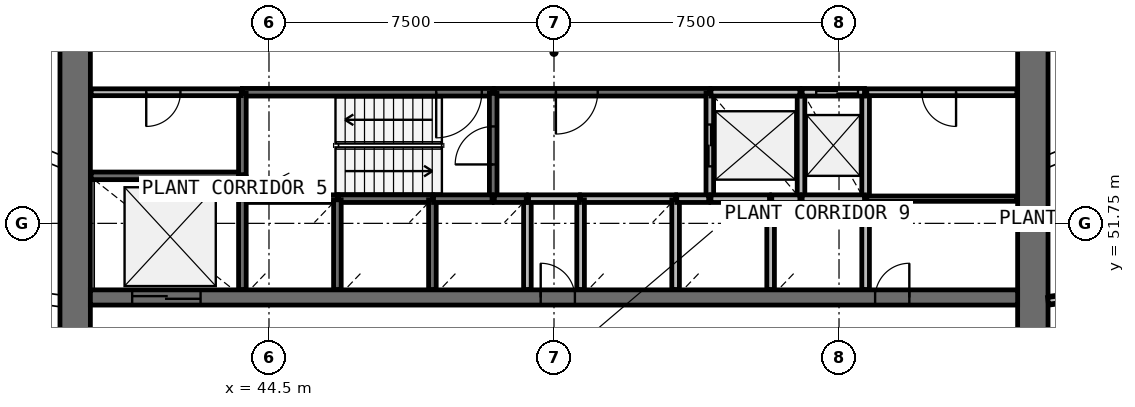
"""IFC4 building model, lengths in metres.
Left out: names, types, materials, properties, quantities, classifications, styles, units other than length and angle.
Written with IfcOpenShell. Run it as: python <this file> out.ifc"""

import sys

from ifc_helpers import new_model, si_unit, direction, frame, frame_2d, origin, place, context, subcontext, project, spatial, rectangle, extrude, source, transform, mapped, element, fill, save


model = new_model("IFC4")
c1 = context("Model", 3, precision=1e-05, world=origin(), true_north=direction((0.0, 1.0)))
c2 = subcontext(c1, "Body", "Model", "MODEL_VIEW")
j1 = project(units=[si_unit("LENGTHUNIT", "METRE"), si_unit("PLANEANGLEUNIT", "RADIAN")], contexts=[c1])
p1 = place(None, origin())
s1 = spatial("IfcSite", under=j1, at=p1, CompositionType="ELEMENT")
p2 = place(p1, origin())
s2 = spatial("IfcBuilding", under=s1, at=p2, CompositionType="ELEMENT")
p3 = place(p2, frame((0.0, 0.0, 129.0)))
s3 = spatial("IfcBuildingStorey", under=s2, at=p3, CompositionType="ELEMENT", Elevation=129.0)
p4 = place(p3, frame((64.6, 38.0, 0.0), z_axis=(0.0, 0.0, 1.0), x_axis=(0.0, 1.0, 0.0)))
e1 = element("IfcWall", 1, at=p4, inside=s3, PredefinedType="SHEAR", context=c2, shape_type="SweptSolid", body=[
    extrude(rectangle(XDim=20.0, YDim=0.8, at=frame_2d((10.0, 0.0))), origin(), (0.0, 0.0, 1.0), 4.1),
])
p5 = place(p4, frame((9.1, 0.0, 0.0)))
e2 = element("IfcOpeningElement", 2, at=p5, cuts=e1, PredefinedType="OPENING", context=c2, shape_type="SweptSolid", body=[
    extrude(rectangle(XDim=1.8, YDim=2.1, at=frame_2d((0.9, 1.05))), frame((0.0, 0.41, 0.0), z_axis=(0.0, -1.0, 0.0), x_axis=(1.0, 0.0, 0.0)), (0.0, 0.0, 1.0), 0.82),
])
p6 = place(p3, frame((39.4, 58.0, 0.0), z_axis=(0.0, 0.0, 1.0), x_axis=(0.0, -1.0, 0.0)))
e3 = element("IfcWall", 3, at=p6, inside=s3, PredefinedType="SHEAR", context=c2, shape_type="SweptSolid", body=[
    extrude(rectangle(XDim=20.0, YDim=0.8, at=frame_2d((10.0, 0.0))), origin(), (0.0, 0.0, 1.0), 4.1),
])
p7 = place(p6, frame((9.1, 0.0, 0.0)))
e4 = element("IfcOpeningElement", 4, at=p7, cuts=e3, PredefinedType="OPENING", context=c2, shape_type="SweptSolid", body=[
    extrude(rectangle(XDim=1.8, YDim=2.1, at=frame_2d((0.9, 1.05))), frame((0.0, 0.41, 0.0), z_axis=(0.0, -1.0, 0.0), x_axis=(1.0, 0.0, 0.0)), (0.0, 0.0, 1.0), 0.82),
])
p8 = place(p3, frame((39.8, 49.8, 0.0), z_axis=(0.0, 0.0, 1.0), x_axis=(1.0, 0.0, 0.0)))
e5 = element("IfcWall", 5, at=p8, inside=s3, PredefinedType="SHEAR", context=c2, shape_type="SweptSolid", body=[
    extrude(rectangle(XDim=24.4, YDim=0.4, at=frame_2d((12.2, 0.0))), origin(), (0.0, 0.0, 1.0), 4.1),
])
p9 = place(p8, frame((1.1, 0.0, 0.0)))
e6 = element("IfcOpeningElement", 6, at=p9, cuts=e5, PredefinedType="OPENING", context=c2, shape_type="SweptSolid", body=[
    extrude(rectangle(XDim=1.8, YDim=2.4, at=frame_2d((0.9, 1.2))), frame((0.0, 0.21, 0.0), z_axis=(0.0, -1.0, 0.0), x_axis=(1.0, 0.0, 0.0)), (0.0, 0.0, 1.0), 0.42),
])
p10 = place(p8, frame((20.65, 0.0, 0.0)))
e7 = element("IfcOpeningElement", 7, at=p10, cuts=e5, PredefinedType="OPENING", context=c2, shape_type="SweptSolid", body=[
    extrude(rectangle(XDim=0.9, YDim=2.1, at=frame_2d((0.45, 1.05))), frame((0.0, 0.21, 0.0), z_axis=(0.0, -1.0, 0.0), x_axis=(1.0, 0.0, 0.0)), (0.0, 0.0, 1.0), 0.42),
])
p11 = place(p8, frame((11.85, 0.0, 0.0)))
e8 = element("IfcOpeningElement", 8, at=p11, cuts=e5, PredefinedType="OPENING", context=c2, shape_type="SweptSolid", body=[
    extrude(rectangle(XDim=0.9, YDim=2.1, at=frame_2d((0.45, 1.05))), frame((0.0, 0.21, 0.0), z_axis=(0.0, -1.0, 0.0), x_axis=(1.0, 0.0, 0.0)), (0.0, 0.0, 1.0), 0.42),
])
p12 = place(p3, frame((50.4, 55.2, 0.0), z_axis=(0.0, 0.0, 1.0), x_axis=(-1.0, 0.0, 0.0)))
e9 = element("IfcWall", 9, at=p12, inside=s3, PredefinedType="SOLIDWALL", context=c2, shape_type="SweptSolid", body=[
    extrude(rectangle(XDim=6.6, YDim=0.2, at=frame_2d((3.3, 0.0))), origin(), (0.0, 0.0, 1.0), 3.78),
])
p13 = place(p12, frame((0.3, 0.0, 0.0)))
e10 = element("IfcOpeningElement", 10, at=p13, cuts=e9, PredefinedType="OPENING", context=c2, shape_type="SweptSolid", body=[
    extrude(rectangle(XDim=1.2, YDim=2.1, at=frame_2d((0.6, 1.05))), frame((0.0, 0.11, 0.0), z_axis=(0.0, -1.0, 0.0), x_axis=(1.0, 0.0, 0.0)), (0.0, 0.0, 1.0), 0.22),
])
p14 = place(p3, frame((56.1, 55.2, 0.0), z_axis=(0.0, 0.0, 1.0), x_axis=(-1.0, 0.0, 0.0)))
e11 = element("IfcWall", 11, at=p14, inside=s3, PredefinedType="SOLIDWALL", context=c2, shape_type="SweptSolid", body=[
    extrude(rectangle(XDim=5.67, YDim=0.2, at=frame_2d((2.835, 0.0))), origin(), (0.0, 0.0, 1.0), 3.78),
])
p15 = place(p14, frame((2.95, 0.0, 0.0)))
e12 = element("IfcOpeningElement", 12, at=p15, cuts=e11, PredefinedType="OPENING", context=c2, shape_type="SweptSolid", body=[
    extrude(rectangle(XDim=1.1, YDim=2.1, at=frame_2d((0.55, 1.05))), frame((0.0, 0.11, 0.0), z_axis=(0.0, -1.0, 0.0), x_axis=(1.0, 0.0, 0.0)), (0.0, 0.0, 1.0), 0.22),
])
p16 = place(p3, frame((43.8, 53.0, 0.0), z_axis=(0.0, 0.0, 1.0), x_axis=(-1.0, 0.0, 0.0)))
e13 = element("IfcWall", 13, at=p16, inside=s3, PredefinedType="SOLIDWALL", context=c2, shape_type="SweptSolid", body=[
    extrude(rectangle(XDim=3.98, YDim=0.2, at=frame_2d((1.99, 0.0))), origin(), (0.0, 0.0, 1.0), 3.78),
])
p17 = place(p3, frame((50.4, 52.4, 0.0), z_axis=(0.0, 0.0, 1.0), x_axis=(0.0, 1.0, 0.0)))
e14 = element("IfcWall", 14, at=p17, inside=s3, PredefinedType="SOLIDWALL", context=c2, shape_type="SweptSolid", body=[
    extrude(rectangle(XDim=2.77, YDim=0.2, at=frame_2d((1.385, 0.0))), origin(), (0.0, 0.0, 1.0), 3.78),
])
p18 = place(p17, frame((0.9, 0.0, 0.0)))
e15 = element("IfcOpeningElement", 15, at=p18, cuts=e14, PredefinedType="OPENING", context=c2, shape_type="SweptSolid", body=[
    extrude(rectangle(XDim=1.0, YDim=2.1, at=frame_2d((0.5, 1.05))), frame((0.0, 0.11, 0.0), z_axis=(0.0, -1.0, 0.0), x_axis=(1.0, 0.0, 0.0)), (0.0, 0.0, 1.0), 0.22),
])
p19 = place(p3, frame((56.1, 55.17, 0.0), z_axis=(0.0, 0.0, 1.0), x_axis=(0.0, -1.0, 0.0)))
e16 = element("IfcWall", 16, at=p19, inside=s3, PredefinedType="SOLIDWALL", context=c2, shape_type="SweptSolid", body=[
    extrude(rectangle(XDim=2.77, YDim=0.2, at=frame_2d((1.385, 0.0))), origin(), (0.0, 0.0, 1.0), 3.78),
])
p20 = place(p19, frame((0.82, 0.0, 0.0)))
e17 = element("IfcOpeningElement", 17, at=p20, cuts=e16, PredefinedType="OPENING", context=c2, shape_type="SweptSolid", body=[
    extrude(rectangle(XDim=1.1, YDim=2.1, at=frame_2d((0.55, 1.05))), frame((0.0, 0.11, 0.0), z_axis=(0.0, -1.0, 0.0), x_axis=(1.0, 0.0, 0.0)), (0.0, 0.0, 1.0), 0.22),
])
for number, where, z_axis, x_axis in (
    (18, (58.5, 52.4, 0.0), (0.0, 0.0, 1.0), (0.0, 1.0, 0.0)),
    (19, (60.2, 52.4, 0.0), (0.0, 0.0, 1.0), (0.0, 1.0, 0.0)),
):
    element("IfcWall", number, at=place(p3, frame(where, z_axis=z_axis, x_axis=x_axis)), inside=s3, PredefinedType="SOLIDWALL", context=c2, shape_type="SweptSolid", body=[
        extrude(rectangle(XDim=2.8, YDim=0.2, at=frame_2d((1.4, 0.0))), origin(), (0.0, 0.0, 1.0), 3.78),
    ])
p21 = place(p3, frame((46.3, 52.4, 0.0), z_axis=(0.0, 0.0, 1.0), x_axis=(-1.0, 0.0, 0.0)))
e20 = element("IfcWall", 20, at=p21, inside=s3, PredefinedType="SOLIDWALL", context=c2, shape_type="SweptSolid", body=[
    extrude(rectangle(XDim=2.5, YDim=0.2, at=frame_2d((1.25, 0.0))), origin(), (0.0, 0.0, 1.0), 3.78),
])
p22 = place(p3, frame((48.8, 52.4, 0.0), z_axis=(0.0, 0.0, 1.0), x_axis=(-1.0, 0.0, 0.0)))
e21 = element("IfcWall", 21, at=p22, inside=s3, PredefinedType="SOLIDWALL", context=c2, shape_type="SweptSolid", body=[
    extrude(rectangle(XDim=2.47, YDim=0.2, at=frame_2d((1.235, 0.0))), origin(), (0.0, 0.0, 1.0), 3.78),
])
p23 = place(p3, frame((55.2, 52.4, 0.0), z_axis=(0.0, 0.0, 1.0), x_axis=(-1.0, 0.0, 0.0)))
e22 = element("IfcWall", 22, at=p23, inside=s3, PredefinedType="SOLIDWALL", context=c2, shape_type="SweptSolid", body=[
    extrude(rectangle(XDim=2.5, YDim=0.2, at=frame_2d((1.25, 0.0))), origin(), (0.0, 0.0, 1.0), 3.78),
])
p24 = place(p3, frame((58.47, 55.2, 0.0), z_axis=(0.0, 0.0, 1.0), x_axis=(-1.0, 0.0, 0.0)))
e23 = element("IfcWall", 23, at=p24, inside=s3, PredefinedType="SOLIDWALL", context=c2, shape_type="SweptSolid", body=[
    extrude(rectangle(XDim=2.34, YDim=0.2, at=frame_2d((1.17, 0.0))), origin(), (0.0, 0.0, 1.0), 3.78),
])
for number, where, z_axis, x_axis in (
    (24, (43.8, 52.37, 0.0), (0.0, 0.0, 1.0), (0.0, -1.0, 0.0)),
    (25, (46.3, 50.01, 0.0), (0.0, 0.0, 1.0), (0.0, 1.0, 0.0)),
    (26, (48.8, 50.01, 0.0), (0.0, 0.0, 1.0), (0.0, 1.0, 0.0)),
):
    element("IfcWall", number, at=place(p3, frame(where, z_axis=z_axis, x_axis=x_axis)), inside=s3, PredefinedType="SOLIDWALL", context=c2, shape_type="SweptSolid", body=[
        extrude(rectangle(XDim=2.36, YDim=0.2, at=frame_2d((1.18, 0.0))), origin(), (0.0, 0.0, 1.0), 3.78),
    ])
p25 = place(p3, frame((51.3, 50.01, 0.0), z_axis=(0.0, 0.0, 1.0), x_axis=(0.0, 1.0, 0.0)))
e27 = element("IfcWall", 27, at=p25, inside=s3, PredefinedType="SOLIDWALL", context=c2, shape_type="SweptSolid", body=[
    extrude(rectangle(XDim=2.39, YDim=0.2, at=frame_2d((1.195, 0.0))), origin(), (0.0, 0.0, 1.0), 3.78),
])
for number, where, z_axis, x_axis in (
    (28, (52.7, 52.37, 0.0), (0.0, 0.0, 1.0), (0.0, -1.0, 0.0)),
    (29, (55.2, 50.01, 0.0), (0.0, 0.0, 1.0), (0.0, 1.0, 0.0)),
):
    element("IfcWall", number, at=place(p3, frame(where, z_axis=z_axis, x_axis=x_axis)), inside=s3, PredefinedType="SOLIDWALL", context=c2, shape_type="SweptSolid", body=[
        extrude(rectangle(XDim=2.36, YDim=0.2, at=frame_2d((1.18, 0.0))), origin(), (0.0, 0.0, 1.0), 3.78),
    ])
p26 = place(p3, frame((57.7, 50.01, 0.0), z_axis=(0.0, 0.0, 1.0), x_axis=(0.0, 1.0, 0.0)))
e30 = element("IfcWall", 30, at=p26, inside=s3, PredefinedType="SOLIDWALL", context=c2, shape_type="SweptSolid", body=[
    extrude(rectangle(XDim=2.39, YDim=0.2, at=frame_2d((1.195, 0.0))), origin(), (0.0, 0.0, 1.0), 3.78),
])
p27 = place(p3, frame((60.2, 50.01, 0.0), z_axis=(0.0, 0.0, 1.0), x_axis=(0.0, 1.0, 0.0)))
e31 = element("IfcWall", 31, at=p27, inside=s3, PredefinedType="SOLIDWALL", context=c2, shape_type="SweptSolid", body=[
    extrude(rectangle(XDim=2.36, YDim=0.2, at=frame_2d((1.18, 0.0))), origin(), (0.0, 0.0, 1.0), 3.78),
])
p28 = place(p3, frame((43.8, 55.17, 0.0), z_axis=(0.0, 0.0, 1.0), x_axis=(0.0, -1.0, 0.0)))
e32 = element("IfcWall", 32, at=p28, inside=s3, PredefinedType="SOLIDWALL", context=c2, shape_type="SweptSolid", body=[
    extrude(rectangle(XDim=2.14, YDim=0.2, at=frame_2d((1.07, 0.0))), origin(), (0.0, 0.0, 1.0), 3.78),
])
p29 = place(p3, frame((60.17, 52.4, 0.0), z_axis=(0.0, 0.0, 1.0), x_axis=(-1.0, 0.0, 0.0)))
e33 = element("IfcWall", 33, at=p29, inside=s3, PredefinedType="SOLIDWALL", context=c2, shape_type="SweptSolid", body=[
    extrude(rectangle(XDim=1.64, YDim=0.2, at=frame_2d((0.82, 0.0))), origin(), (0.0, 0.0, 1.0), 3.78),
])
p30 = place(p3, frame((60.17, 55.2, 0.0), z_axis=(0.0, 0.0, 1.0), x_axis=(-1.0, 0.0, 0.0)))
e34 = element("IfcWall", 34, at=p30, inside=s3, PredefinedType="SOLIDWALL", context=c2, shape_type="SweptSolid", body=[
    extrude(rectangle(XDim=1.64, YDim=0.2, at=frame_2d((0.82, 0.0))), origin(), (0.0, 0.0, 1.0), 3.78),
])
p31 = place(p30, frame((0.17, 0.0, 0.0)))
e35 = element("IfcOpeningElement", 35, at=p31, cuts=e34, PredefinedType="OPENING", context=c2, shape_type="SweptSolid", body=[
    extrude(rectangle(XDim=1.1, YDim=2.1, at=frame_2d((0.55, 1.05))), frame((0.0, 0.11, 0.0), z_axis=(0.0, -1.0, 0.0), x_axis=(1.0, 0.0, 0.0)), (0.0, 0.0, 1.0), 0.22),
])
for number, where, z_axis, x_axis in (
    (36, (50.37, 52.4, 0.0), (0.0, 0.0, 1.0), (-1.0, 0.0, 0.0)),
    (37, (57.67, 52.4, 0.0), (0.0, 0.0, 1.0), (-1.0, 0.0, 0.0)),
):
    element("IfcWall", number, at=place(p3, frame(where, z_axis=z_axis, x_axis=x_axis)), inside=s3, PredefinedType="SOLIDWALL", context=c2, shape_type="SweptSolid", body=[
        extrude(rectangle(XDim=1.54, YDim=0.2, at=frame_2d((0.77, 0.0))), origin(), (0.0, 0.0, 1.0), 3.78),
    ])
p32 = place(p3, frame((51.33, 52.4, 0.0), z_axis=(0.0, 0.0, 1.0), x_axis=(1.0, 0.0, 0.0)))
e38 = element("IfcWall", 38, at=p32, inside=s3, PredefinedType="SOLIDWALL", context=c2, shape_type="SweptSolid", body=[
    extrude(rectangle(XDim=1.34, YDim=0.2, at=frame_2d((0.67, 0.0))), origin(), (0.0, 0.0, 1.0), 3.78),
])
for number, where, z_axis, x_axis in (
    (39, (51.27, 52.4, 0.0), (0.0, 0.0, 1.0), (-1.0, 0.0, 0.0)),
    (40, (56.07, 52.4, 0.0), (0.0, 0.0, 1.0), (-1.0, 0.0, 0.0)),
):
    element("IfcWall", number, at=place(p3, frame(where, z_axis=z_axis, x_axis=x_axis)), inside=s3, PredefinedType="SOLIDWALL", context=c2, shape_type="SweptSolid", body=[
        extrude(rectangle(XDim=0.84, YDim=0.2, at=frame_2d((0.42, 0.0))), origin(), (0.0, 0.0, 1.0), 3.78),
    ])
p33 = place(p3, frame((58.47, 52.4, 0.0), z_axis=(0.0, 0.0, 1.0), x_axis=(-1.0, 0.0, 0.0)))
e41 = element("IfcWall", 41, at=p33, inside=s3, PredefinedType="SOLIDWALL", context=c2, shape_type="SweptSolid", body=[
    extrude(rectangle(XDim=0.74, YDim=0.2, at=frame_2d((0.37, 0.0))), origin(), (0.0, 0.0, 1.0), 3.78),
])
p34 = place(p3, frame((43.8, 52.43, 0.0), z_axis=(0.0, 0.0, 1.0), x_axis=(0.0, 1.0, 0.0)))
e42 = element("IfcWall", 42, at=p34, inside=s3, PredefinedType="SOLIDWALL", context=c2, shape_type="SweptSolid", body=[
    extrude(rectangle(XDim=0.54, YDim=0.2, at=frame_2d((0.27, 0.0))), origin(), (0.0, 0.0, 1.0), 3.78),
])
p35 = place(p3, frame((64.18, 55.2, 0.0), z_axis=(0.0, 0.0, 1.0), x_axis=(-1.0, 0.0, 0.0)))
e43 = element("IfcWall", 43, at=p35, inside=s3, PredefinedType="PARTITIONING", context=c2, shape_type="SweptSolid", body=[
    extrude(rectangle(XDim=3.95, YDim=0.18, at=frame_2d((1.975, 0.0))), origin(), (0.0, 0.0, 1.0), 3.78),
])
p36 = place(p35, frame((1.6, 0.0, 0.0)))
e44 = element("IfcOpeningElement", 44, at=p36, cuts=e43, PredefinedType="OPENING", context=c2, shape_type="SweptSolid", body=[
    extrude(rectangle(XDim=0.9, YDim=2.1, at=frame_2d((0.45, 1.05))), frame((0.0, 0.1, 0.0), z_axis=(0.0, -1.0, 0.0), x_axis=(1.0, 0.0, 0.0)), (0.0, 0.0, 1.0), 0.2),
])
p37 = place(p3, frame((43.77, 55.2, 0.0), z_axis=(0.0, 0.0, 1.0), x_axis=(-1.0, 0.0, 0.0)))
e45 = element("IfcWall", 45, at=p37, inside=s3, PredefinedType="PARTITIONING", context=c2, shape_type="SweptSolid", body=[
    extrude(rectangle(XDim=3.95, YDim=0.18, at=frame_2d((1.975, 0.0))), origin(), (0.0, 0.0, 1.0), 3.78),
])
p38 = place(p37, frame((1.6, 0.0, 0.0)))
e46 = element("IfcOpeningElement", 46, at=p38, cuts=e45, PredefinedType="OPENING", context=c2, shape_type="SweptSolid", body=[
    extrude(rectangle(XDim=0.9, YDim=2.1, at=frame_2d((0.45, 1.05))), frame((0.0, 0.1, 0.0), z_axis=(0.0, -1.0, 0.0), x_axis=(1.0, 0.0, 0.0)), (0.0, 0.0, 1.0), 0.2),
])
p39 = place(p3, frame((67.31, 50.016, 0.0), z_axis=(0.0, 0.0, 1.0), x_axis=(-0.991440737811, -0.130557509967, 0.0)))
e47 = element("IfcWall", 47, at=p39, inside=s3, PredefinedType="PARTITIONING", context=c2, shape_type="SweptSolid", body=[
    extrude(rectangle(XDim=2.33, YDim=0.18, at=frame_2d((1.165, 0.0))), origin(), (0.0, 0.0, 1.0), 2.58),
])
p40 = place(p39, frame((0.48, 0.0, 0.0)))
e48 = element("IfcOpeningElement", 48, at=p40, cuts=e47, PredefinedType="OPENING", context=c2, shape_type="SweptSolid", body=[
    extrude(rectangle(XDim=1.2, YDim=2.1, at=frame_2d((0.6, 1.05))), frame((0.0, 0.1, 0.0), z_axis=(0.0, -1.0, 0.0), x_axis=(1.0, 0.0, 0.0)), (0.0, 0.0, 1.0), 0.2),
])
p41 = place(p3, frame((64.18, 52.4, 0.0), z_axis=(0.0, 0.0, 1.0), x_axis=(-1.0, 0.0, 0.0)))
e49 = element("IfcWall", 49, at=p41, inside=s3, PredefinedType="PARTITIONING", context=c2, shape_type="SweptSolid", body=[
    extrude(rectangle(XDim=3.95, YDim=0.14, at=frame_2d((1.975, 0.0))), origin(), (0.0, 0.0, 1.0), 2.98),
])
m1 = source(origin(), c2, "Body", "SweptSolid", [
    extrude(rectangle(XDim=1.1, YDim=2.1, at=frame_2d((0.55, 1.05))), frame((0.0, 0.025, 0.0), z_axis=(0.0, -1.0, 0.0), x_axis=(1.0, 0.0, 0.0)), (0.0, 0.0, 1.0), 0.05),
])
p42 = place(p20, origin())
e50 = element("IfcDoor", 50, at=p42, inside=s3, OperationType="DOUBLE_DOOR_SLIDING", PredefinedType="USERDEFINED", context=c2, shape_type="MappedRepresentation", body=[
    mapped(m1, transform((0.0, 0.0, 0.0), scale=1.0)),
])
fill(e17, e50)
p43 = place(p31, origin())
e51 = element("IfcDoor", 51, at=p43, inside=s3, OperationType="DOUBLE_DOOR_SLIDING", PredefinedType="USERDEFINED", context=c2, shape_type="MappedRepresentation", body=[
    mapped(m1, transform((0.0, 0.0, 0.0), scale=1.0)),
])
fill(e35, e51)
m2 = source(origin(), c2, "Body", "SweptSolid", [
    extrude(rectangle(XDim=1.8, YDim=2.4, at=frame_2d((0.9, 1.2))), frame((0.0, 0.025, 0.0), z_axis=(0.0, -1.0, 0.0), x_axis=(1.0, 0.0, 0.0)), (0.0, 0.0, 1.0), 0.05),
])
p44 = place(p9, origin())
e52 = element("IfcDoor", 52, at=p44, inside=s3, OperationType="DOUBLE_DOOR_SLIDING", PredefinedType="USERDEFINED", context=c2, shape_type="MappedRepresentation", body=[
    mapped(m2, transform((0.0, 0.0, 0.0), scale=1.0)),
])
fill(e6, e52)
m3 = source(origin(), c2, "Body", "SweptSolid", [
    extrude(rectangle(XDim=1.2, YDim=2.1, at=frame_2d((0.6, 1.05))), frame((0.0, 0.025, 0.0), z_axis=(0.0, -1.0, 0.0), x_axis=(1.0, 0.0, 0.0)), (0.0, 0.0, 1.0), 0.05),
])
p45 = place(p13, origin())
e53 = element("IfcDoor", 53, at=p45, inside=s3, OperationType="SINGLE_SWING_RIGHT", PredefinedType="DOOR", context=c2, shape_type="MappedRepresentation", body=[
    mapped(m3, transform((0.0, 0.0, 0.0), scale=1.0)),
])
fill(e10, e53)
m4 = source(origin(), c2, "Body", "SweptSolid", [
    extrude(rectangle(XDim=1.0, YDim=2.1, at=frame_2d((0.5, 1.05))), frame((0.0, 0.025, 0.0), z_axis=(0.0, -1.0, 0.0), x_axis=(1.0, 0.0, 0.0)), (0.0, 0.0, 1.0), 0.05),
])
p46 = place(p18, origin())
e54 = element("IfcDoor", 54, at=p46, inside=s3, OperationType="SINGLE_SWING_LEFT", PredefinedType="DOOR", context=c2, shape_type="MappedRepresentation", body=[
    mapped(m4, transform((0.0, 0.0, 0.0), scale=1.0)),
])
fill(e15, e54)
m5 = source(origin(), c2, "Body", "SweptSolid", [
    extrude(rectangle(XDim=1.1, YDim=2.1, at=frame_2d((0.55, 1.05))), frame((0.0, 0.025, 0.0), z_axis=(0.0, -1.0, 0.0), x_axis=(1.0, 0.0, 0.0)), (0.0, 0.0, 1.0), 0.05),
])
p47 = place(p15, origin())
e55 = element("IfcDoor", 55, at=p47, inside=s3, OperationType="SINGLE_SWING_RIGHT", PredefinedType="DOOR", context=c2, shape_type="MappedRepresentation", body=[
    mapped(m5, transform((0.0, 0.0, 0.0), scale=1.0)),
])
fill(e12, e55)
m6 = source(origin(), c2, "Body", "SweptSolid", [
    extrude(rectangle(XDim=0.9, YDim=2.1, at=frame_2d((0.45, 1.05))), frame((0.0, 0.025, 0.0), z_axis=(0.0, -1.0, 0.0), x_axis=(1.0, 0.0, 0.0)), (0.0, 0.0, 1.0), 0.05),
])
p48 = place(p38, origin())
e56 = element("IfcDoor", 56, at=p48, inside=s3, OperationType="SINGLE_SWING_RIGHT", PredefinedType="DOOR", context=c2, shape_type="MappedRepresentation", body=[
    mapped(m6, transform((0.0, 0.0, 0.0), scale=1.0)),
])
fill(e46, e56)
p49 = place(p10, origin())
e57 = element("IfcDoor", 57, at=p49, inside=s3, OperationType="SINGLE_SWING_RIGHT", PredefinedType="DOOR", context=c2, shape_type="MappedRepresentation", body=[
    mapped(m6, transform((0.0, 0.0, 0.0), scale=1.0)),
])
fill(e7, e57)
p50 = place(p36, origin())
e58 = element("IfcDoor", 58, at=p50, inside=s3, OperationType="SINGLE_SWING_LEFT", PredefinedType="DOOR", context=c2, shape_type="MappedRepresentation", body=[
    mapped(m6, transform((0.0, 0.0, 0.0), scale=1.0)),
])
fill(e44, e58)
p51 = place(p11, origin())
e59 = element("IfcDoor", 59, at=p51, inside=s3, OperationType="SINGLE_SWING_LEFT", PredefinedType="DOOR", context=c2, shape_type="MappedRepresentation", body=[
    mapped(m6, transform((0.0, 0.0, 0.0), scale=1.0)),
])
fill(e8, e59)
save(model, sys.argv[1])
